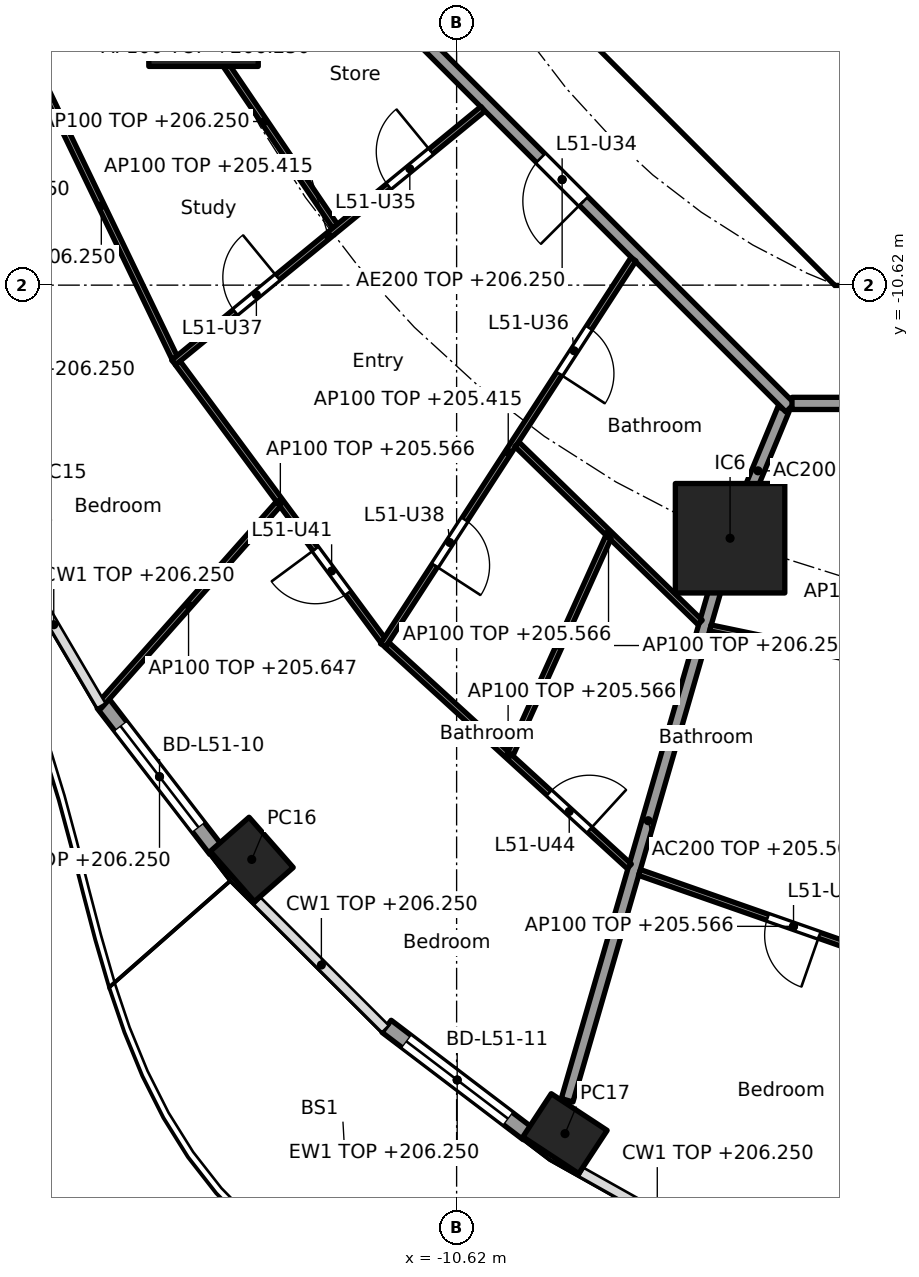
"""IFC4 building model, lengths in metres.
Left out: names, types, materials, properties, quantities, classifications, styles, units other than length and angle.
Written with IfcOpenShell. Run it as: python <this file> out.ifc"""

import sys

from ifc_helpers import new_model, si_unit, direction, frame, frame_2d, origin, origin_2d, place, context, subcontext, project, spatial, polyline, rectangle, hollow_rectangle, outline, extrude, element, fill, save


model = new_model("IFC4")
c1 = context("Model", 3, precision=1e-05, world=origin(), true_north=direction((0.0, 1.0)))
c2 = subcontext(c1, "Body", "Model", "MODEL_VIEW")
j1 = project(units=[si_unit("LENGTHUNIT", "METRE"), si_unit("PLANEANGLEUNIT", "RADIAN")], contexts=[c1])
p1 = place(None, origin())
s1 = spatial("IfcSite", under=j1, at=p1, CompositionType="ELEMENT")
p2 = place(p1, origin())
s2 = spatial("IfcBuilding", under=s1, at=p2, CompositionType="ELEMENT")
p3 = place(p2, frame((0.0, 0.0, 202.9)))
s3 = spatial("IfcBuildingStorey", under=s2, at=p3, CompositionType="ELEMENT", Elevation=202.9)
for number, where, z_axis, x_axis in (
    (1, (-13.989, -20.064, 0.0), (0.0, 0.0, 1.0), (0.66, -0.751, 0.0)),
    (2, (-8.837, -24.573, 0.0), (0.0, 0.0, 1.0), (0.836, -0.549, 0.0)),
):
    element("IfcColumn", number, at=place(p3, frame(where, z_axis=z_axis, x_axis=x_axis)), inside=s3, PredefinedType="COLUMN", context=c2, shape_type="SweptSolid", body=[
        extrude(hollow_rectangle(XDim=1.1, YDim=0.85, WallThickness=0.036, at=origin_2d()), origin(), (0.0, 0.0, 1.0), 3.7),
    ])
for number, where, z_axis, x_axis in (
    (3, (-14.782, -6.123, 0.0), (0.0, 0.0, 1.0), (1.0, 0.0, 0.0)),
    (4, (-6.123, -14.782, 0.0), (0.0, 0.0, 1.0), (1.0, 0.0, 0.0)),
):
    element("IfcColumn", number, at=place(p3, frame(where, z_axis=z_axis, x_axis=x_axis)), inside=s3, PredefinedType="COLUMN", context=c2, shape_type="SweptSolid", body=[
        extrude(rectangle(XDim=1.8, YDim=1.8, at=origin_2d()), origin(), (0.0, 0.0, 1.0), 3.7),
    ])
p4 = place(p3, frame((-14.58, -19.906, 0.0), z_axis=(0.0, 0.0, 1.0), x_axis=(-0.610437428894, 0.79206448311, 0.0)))
e5 = element("IfcWall", 5, at=p4, inside=s3, PredefinedType="SOLIDWALL", context=c2, shape_type="SweptSolid", body=[
    extrude(rectangle(XDim=3.035, YDim=0.25, at=frame_2d((1.518, 0.0))), origin(), (0.0, 0.0, 1.0), 3.35),
])
p5 = place(p4, frame((0.468, 0.0, 0.0)))
e6 = element("IfcOpeningElement", 6, at=p5, cuts=e5, PredefinedType="OPENING", context=c2, shape_type="SweptSolid", body=[
    extrude(rectangle(XDim=2.1, YDim=2.4, at=frame_2d((1.05, 1.2))), frame((0.0, 0.135, 0.0), z_axis=(0.0, -1.0, 0.0), x_axis=(1.0, 0.0, 0.0)), (0.0, 0.0, 1.0), 0.27),
])
p6 = place(p3, frame((-9.45, -24.574, 0.0), z_axis=(0.0, 0.0, 1.0), x_axis=(-0.796055733703, 0.60522332146, 0.0)))
e7 = element("IfcWall", 7, at=p6, inside=s3, PredefinedType="SOLIDWALL", context=c2, shape_type="SweptSolid", body=[
    extrude(rectangle(XDim=2.917, YDim=0.25, at=frame_2d((1.458, 0.0))), origin(), (0.0, 0.0, 1.0), 3.35),
])
p7 = place(p6, frame((0.408, 0.0, 0.0)))
e8 = element("IfcOpeningElement", 8, at=p7, cuts=e7, PredefinedType="OPENING", context=c2, shape_type="SweptSolid", body=[
    extrude(rectangle(XDim=2.1, YDim=2.4, at=frame_2d((1.05, 1.2))), frame((0.0, 0.135, 0.0), z_axis=(0.0, -1.0, 0.0), x_axis=(1.0, 0.0, 0.0)), (0.0, 0.0, 1.0), 0.27),
])
p8 = place(p3, frame((-9.988, -4.613, 0.0), z_axis=(0.0, 0.0, 1.0), x_axis=(0.707106781187, -0.707106781187, 0.0)))
e9 = element("IfcWall", 9, at=p8, inside=s3, PredefinedType="SHEAR", context=c2, shape_type="SweptSolid", body=[
    extrude(rectangle(XDim=7.602, YDim=0.6, at=frame_2d((3.801, 0.0))), origin(), (0.0, 0.0, 1.0), 3.35),
])
p9 = place(p8, frame((6.151, 0.0, 0.0)))
e10 = element("IfcOpeningElement", 10, at=p9, cuts=e9, PredefinedType="OPENING", context=c2, shape_type="SweptSolid", body=[
    extrude(rectangle(XDim=1.1, YDim=2.1, at=frame_2d((0.55, 1.05))), frame((0.0, 0.31, 0.0), z_axis=(0.0, -1.0, 0.0), x_axis=(1.0, 0.0, 0.0)), (0.0, 0.0, 1.0), 0.62),
])
p10 = place(p3, frame((-6.2, -7.827, 0.0), z_axis=(0.0, 0.0, 1.0), x_axis=(0.0, 1.0, 0.0)))
e11 = element("IfcWall", 11, at=p10, inside=s3, PredefinedType="PARTITIONING", context=c2, shape_type="SweptSolid", body=[
    extrude(rectangle(XDim=3.527, YDim=0.15, at=frame_2d((1.763, 0.0))), origin(), (0.0, 0.0, 1.0), 3.35),
])
p11 = place(p10, frame((2.365, 0.0, 0.0)))
e12 = element("IfcOpeningElement", 12, at=p11, cuts=e11, PredefinedType="OPENING", context=c2, shape_type="SweptSolid", body=[
    extrude(rectangle(XDim=0.9, YDim=2.1, at=frame_2d((0.45, 1.05))), frame((0.0, 0.085, 0.0), z_axis=(0.0, -1.0, 0.0), x_axis=(1.0, 0.0, 0.0)), (0.0, 0.0, 1.0), 0.17),
])
p12 = place(p10, frame((0.489, 0.0, 0.0)))
e13 = element("IfcOpeningElement", 13, at=p12, cuts=e11, PredefinedType="OPENING", context=c2, shape_type="SweptSolid", body=[
    extrude(rectangle(XDim=0.9, YDim=2.1, at=frame_2d((0.45, 1.05))), frame((0.0, 0.085, 0.0), z_axis=(0.0, -1.0, 0.0), x_axis=(1.0, 0.0, 0.0)), (0.0, 0.0, 1.0), 0.17),
])
p13 = place(p3, origin())
e14 = element("IfcWall", 14, at=p13, inside=s3, PredefinedType="SHEAR", context=c2, shape_type="SweptSolid", body=[
    extrude(outline(polyline([(-4.152, -10.025), (4.152, -10.025), (4.401, -9.776), (4.825, -10.2), (4.401, -10.625), (-4.401, -10.625), (-4.825, -10.2), (-4.401, -9.776), (-4.152, -10.025)])), origin(), (0.0, 0.0, 1.0), 3.35),
])
p14 = place(p3, frame((-5.243, -12.657, 0.0), z_axis=(0.0, 0.0, 1.0), x_axis=(-0.382707856524, -0.923869415315, 0.0)))
e15 = element("IfcWall", 15, at=p14, inside=s3, PredefinedType="PARTITIONING", context=c2, shape_type="SweptSolid", body=[
    extrude(rectangle(XDim=2.2, YDim=0.2, at=frame_2d((1.1, 0.0))), origin(), (0.0, 0.0, 1.0), 3.35),
])
p15 = place(p3, frame((-6.137, -14.83, 0.0), z_axis=(0.0, 0.0, 1.0), x_axis=(-0.278461169897, -0.96044748782, 0.0)))
e16 = element("IfcWall", 16, at=p15, inside=s3, PredefinedType="PARTITIONING", context=c2, shape_type="SweptSolid", body=[
    extrude(rectangle(XDim=9.573, YDim=0.2, at=frame_2d((4.787, 0.0))), origin(), (0.0, 0.0, 1.0), 2.666),
])
p16 = place(p3, frame((-12.635, -5.134, 0.0), z_axis=(0.0, 0.0, 1.0), x_axis=(0.707106781187, -0.707106781187, 0.0)))
e17 = element("IfcWall", 17, at=p16, inside=s3, PredefinedType="PARTITIONING", context=c2, shape_type="SweptSolid", body=[
    extrude(rectangle(XDim=10.609, YDim=0.2, at=frame_2d((5.305, 0.0))), origin(), (0.0, 0.0, 1.0), 3.35),
])
p17 = place(p16, frame((4.804, 0.0, 0.0)))
e18 = element("IfcOpeningElement", 18, at=p17, cuts=e17, PredefinedType="OPENING", context=c2, shape_type="SweptSolid", body=[
    extrude(rectangle(XDim=1.0, YDim=2.1, at=frame_2d((0.5, 1.05))), frame((0.0, 0.11, 0.0), z_axis=(0.0, -1.0, 0.0), x_axis=(1.0, 0.0, 0.0)), (0.0, 0.0, 1.0), 0.22),
])
p18 = place(p3, frame((-5.104, -12.565, 0.0), z_axis=(0.0, 0.0, 1.0), x_axis=(1.0, 0.0, 0.0)))
e19 = element("IfcWall", 19, at=p18, inside=s3, PredefinedType="PARTITIONING", context=c2, shape_type="SweptSolid", body=[
    extrude(rectangle(XDim=10.409, YDim=0.2, at=frame_2d((5.205, 0.0))), origin(), (0.0, 0.0, 1.0), 3.35),
])
p19 = place(p18, frame((6.339, 0.0, 0.0)))
e20 = element("IfcOpeningElement", 20, at=p19, cuts=e19, PredefinedType="OPENING", context=c2, shape_type="SweptSolid", body=[
    extrude(rectangle(XDim=1.0, YDim=2.1, at=frame_2d((0.5, 1.05))), frame((0.0, 0.11, 0.0), z_axis=(0.0, -1.0, 0.0), x_axis=(1.0, 0.0, 0.0)), (0.0, 0.0, 1.0), 0.22),
])
p20 = place(p3, frame((-14.952, -6.208, 0.0), z_axis=(0.0, 0.0, 1.0), x_axis=(0.561064907171, -0.827771810308, 0.0)))
e21 = element("IfcWall", 21, at=p20, inside=s3, PredefinedType="PARTITIONING", context=c2, shape_type="SweptSolid", body=[
    extrude(rectangle(XDim=4.159, YDim=0.1, at=frame_2d((2.079, 0.0))), origin(), (0.0, 0.0, 1.0), 3.35),
])
p21 = place(p3, frame((-17.669, -6.809, 0.0), z_axis=(0.0, 0.0, 1.0), x_axis=(0.434040130629, -0.900893536997, 0.0)))
e22 = element("IfcWall", 22, at=p21, inside=s3, PredefinedType="PARTITIONING", context=c2, shape_type="SweptSolid", body=[
    extrude(rectangle(XDim=5.558, YDim=0.1, at=frame_2d((2.779, 0.0))), origin(), (0.0, 0.0, 1.0), 3.35),
])
p22 = place(p3, frame((-10.189, -7.721, 0.0), z_axis=(0.0, 0.0, 1.0), x_axis=(-0.773121441079, -0.634258021112, 0.0)))
e23 = element("IfcWall", 23, at=p22, inside=s3, PredefinedType="PARTITIONING", context=c2, shape_type="SweptSolid", body=[
    extrude(rectangle(XDim=6.577, YDim=0.1, at=frame_2d((3.289, 0.0))), origin(), (0.0, 0.0, 1.0), 2.515),
])
p23 = place(p22, frame((1.104, 0.0, 0.0)))
e24 = element("IfcOpeningElement", 24, at=p23, cuts=e23, PredefinedType="OPENING", context=c2, shape_type="SweptSolid", body=[
    extrude(rectangle(XDim=0.9, YDim=2.1, at=frame_2d((0.45, 1.05))), frame((0.0, 0.06, 0.0), z_axis=(0.0, -1.0, 0.0), x_axis=(1.0, 0.0, 0.0)), (0.0, 0.0, 1.0), 0.12),
])
p24 = place(p22, frame((4.367, 0.0, 0.0)))
e25 = element("IfcOpeningElement", 25, at=p24, cuts=e23, PredefinedType="OPENING", context=c2, shape_type="SweptSolid", body=[
    extrude(rectangle(XDim=0.9, YDim=2.1, at=frame_2d((0.45, 1.05))), frame((0.0, 0.06, 0.0), z_axis=(0.0, -1.0, 0.0), x_axis=(1.0, 0.0, 0.0)), (0.0, 0.0, 1.0), 0.12),
])
p25 = place(p3, frame((-15.205, -11.901, 0.0), z_axis=(0.0, 0.0, 1.0), x_axis=(0.594704483906, -0.803944386647, 0.0)))
e26 = element("IfcWall", 26, at=p25, inside=s3, PredefinedType="PARTITIONING", context=c2, shape_type="SweptSolid", body=[
    extrude(rectangle(XDim=5.672, YDim=0.1, at=frame_2d((2.836, 0.0))), origin(), (0.0, 0.0, 1.0), 2.666),
])
p26 = place(p25, frame((3.804, 0.0, 0.0)))
e27 = element("IfcOpeningElement", 27, at=p26, cuts=e26, PredefinedType="OPENING", context=c2, shape_type="SweptSolid", body=[
    extrude(rectangle(XDim=0.9, YDim=2.1, at=frame_2d((0.45, 1.05))), frame((0.0, 0.06, 0.0), z_axis=(0.0, -1.0, 0.0), x_axis=(1.0, 0.0, 0.0)), (0.0, 0.0, 1.0), 0.12),
])
p27 = place(p3, frame((-13.552, -14.219, 0.0), z_axis=(0.0, 0.0, 1.0), x_axis=(-0.663542794709, -0.748138329181, 0.0)))
e28 = element("IfcWall", 28, at=p27, inside=s3, PredefinedType="PARTITIONING", context=c2, shape_type="SweptSolid", body=[
    extrude(rectangle(XDim=4.45, YDim=0.1, at=frame_2d((2.225, 0.0))), origin(), (0.0, 0.0, 1.0), 2.747),
])
p28 = place(p3, frame((-7.712, -10.195, 0.0), z_axis=(0.0, 0.0, 1.0), x_axis=(-0.544179442551, -0.838968851809, 0.0)))
e29 = element("IfcWall", 29, at=p28, inside=s3, PredefinedType="PARTITIONING", context=c2, shape_type="SweptSolid", body=[
    extrude(rectangle(XDim=7.566, YDim=0.1, at=frame_2d((3.783, 0.0))), origin(), (0.0, 0.0, 1.0), 2.515),
])
p29 = place(p28, frame((1.343, 0.0, 0.0)))
e30 = element("IfcOpeningElement", 30, at=p29, cuts=e29, PredefinedType="OPENING", context=c2, shape_type="SweptSolid", body=[
    extrude(rectangle(XDim=0.9, YDim=2.1, at=frame_2d((0.45, 1.05))), frame((0.0, 0.06, 0.0), z_axis=(0.0, -1.0, 0.0), x_axis=(1.0, 0.0, 0.0)), (0.0, 0.0, 1.0), 0.12),
])
p30 = place(p28, frame((5.101, 0.0, 0.0)))
e31 = element("IfcOpeningElement", 31, at=p30, cuts=e29, PredefinedType="OPENING", context=c2, shape_type="SweptSolid", body=[
    extrude(rectangle(XDim=0.9, YDim=2.1, at=frame_2d((0.45, 1.05))), frame((0.0, 0.06, 0.0), z_axis=(0.0, -1.0, 0.0), x_axis=(1.0, 0.0, 0.0)), (0.0, 0.0, 1.0), 0.12),
])
p31 = place(p3, frame((-9.627, -13.238, 0.0), z_axis=(0.0, 0.0, 1.0), x_axis=(0.716919058692, -0.697156412352, 0.0)))
e32 = element("IfcWall", 32, at=p31, inside=s3, PredefinedType="PARTITIONING", context=c2, shape_type="SweptSolid", body=[
    extrude(rectangle(XDim=4.2, YDim=0.1, at=frame_2d((2.1, 0.0))), origin(), (0.0, 0.0, 1.0), 2.666),
])
p32 = place(p3, frame((-11.766, -16.535, 0.0), z_axis=(0.0, 0.0, 1.0), x_axis=(0.73807320557, -0.674720640872, 0.0)))
e33 = element("IfcWall", 33, at=p32, inside=s3, PredefinedType="PARTITIONING", context=c2, shape_type="SweptSolid", body=[
    extrude(rectangle(XDim=5.399, YDim=0.1, at=frame_2d((2.699, 0.0))), origin(), (0.0, 0.0, 1.0), 2.666),
])
p33 = place(p32, frame((3.612, 0.0, 0.0)))
e34 = element("IfcOpeningElement", 34, at=p33, cuts=e33, PredefinedType="OPENING", context=c2, shape_type="SweptSolid", body=[
    extrude(rectangle(XDim=0.9, YDim=2.1, at=frame_2d((0.45, 1.05))), frame((0.0, 0.06, 0.0), z_axis=(0.0, -1.0, 0.0), x_axis=(1.0, 0.0, 0.0)), (0.0, 0.0, 1.0), 0.12),
])
p34 = place(p3, frame((-8.125, -14.765, 0.0), z_axis=(0.0, 0.0, 1.0), x_axis=(-0.411745679848, -0.911298795745, 0.0)))
e35 = element("IfcWall", 35, at=p34, inside=s3, PredefinedType="PARTITIONING", context=c2, shape_type="SweptSolid", body=[
    extrude(rectangle(XDim=3.909, YDim=0.1, at=frame_2d((1.955, 0.0))), origin(), (0.0, 0.0, 1.0), 3.35),
])
p35 = place(p3, frame((-6.447, -16.256, 0.0), z_axis=(0.0, 0.0, 1.0), x_axis=(0.978902917122, -0.20432591331, 0.0)))
e36 = element("IfcWall", 36, at=p35, inside=s3, PredefinedType="PARTITIONING", context=c2, shape_type="SweptSolid", body=[
    extrude(rectangle(XDim=4.486, YDim=0.1, at=frame_2d((2.243, 0.0))), origin(), (0.0, 0.0, 1.0), 2.666),
])
p36 = place(p3, frame((-7.613, -20.278, 0.0), z_axis=(0.0, 0.0, 1.0), x_axis=(0.94391294884, -0.330194404878, 0.0)))
e37 = element("IfcWall", 37, at=p36, inside=s3, PredefinedType="PARTITIONING", context=c2, shape_type="SweptSolid", body=[
    extrude(rectangle(XDim=5.367, YDim=0.1, at=frame_2d((2.684, 0.0))), origin(), (0.0, 0.0, 1.0), 2.666),
])
p37 = place(p36, frame((2.234, 0.0, 0.0)))
e38 = element("IfcOpeningElement", 38, at=p37, cuts=e37, PredefinedType="OPENING", context=c2, shape_type="SweptSolid", body=[
    extrude(rectangle(XDim=0.9, YDim=2.1, at=frame_2d((0.45, 1.05))), frame((0.0, 0.06, 0.0), z_axis=(0.0, -1.0, 0.0), x_axis=(1.0, 0.0, 0.0)), (0.0, 0.0, 1.0), 0.12),
])
p38 = place(p5, origin())
e39 = element("IfcDoor", 39, at=p38, inside=s3, OperationType="SLIDING_TO_LEFT", PredefinedType="DOOR", context=c2, shape_type="SweptSolid", body=[
    extrude(rectangle(XDim=2.1, YDim=2.4, at=frame_2d((1.05, 1.2))), frame((0.0, 0.025, 0.0), z_axis=(0.0, -1.0, 0.0), x_axis=(1.0, 0.0, 0.0)), (0.0, 0.0, 1.0), 0.05),
])
fill(e6, e39)
p39 = place(p7, origin())
e40 = element("IfcDoor", 40, at=p39, inside=s3, OperationType="SLIDING_TO_LEFT", PredefinedType="DOOR", context=c2, shape_type="SweptSolid", body=[
    extrude(rectangle(XDim=2.1, YDim=2.4, at=frame_2d((1.05, 1.2))), frame((0.0, 0.025, 0.0), z_axis=(0.0, -1.0, 0.0), x_axis=(1.0, 0.0, 0.0)), (0.0, 0.0, 1.0), 0.05),
])
fill(e8, e40)
p40 = place(p12, origin())
e41 = element("IfcDoor", 41, at=p40, inside=s3, OperationType="SINGLE_SWING_RIGHT", PredefinedType="DOOR", context=c2, shape_type="SweptSolid", body=[
    extrude(rectangle(XDim=0.9, YDim=2.1, at=frame_2d((0.45, 1.05))), frame((0.0, 0.025, 0.0), z_axis=(0.0, -1.0, 0.0), x_axis=(1.0, 0.0, 0.0)), (0.0, 0.0, 1.0), 0.05),
])
fill(e13, e41)
p41 = place(p9, origin())
e42 = element("IfcDoor", 42, at=p41, inside=s3, OperationType="SINGLE_SWING_RIGHT", PredefinedType="DOOR", context=c2, shape_type="SweptSolid", body=[
    extrude(rectangle(XDim=1.1, YDim=2.1, at=frame_2d((0.55, 1.05))), frame((0.0, 0.025, 0.0), z_axis=(0.0, -1.0, 0.0), x_axis=(1.0, 0.0, 0.0)), (0.0, 0.0, 1.0), 0.05),
])
fill(e10, e42)
p42 = place(p37, frame((0.9, 0.0, 0.0), x_axis=(-1.0, 0.0, 0.0)))
e43 = element("IfcDoor", 43, at=p42, inside=s3, OperationType="SINGLE_SWING_LEFT", PredefinedType="DOOR", context=c2, shape_type="SweptSolid", body=[
    extrude(rectangle(XDim=0.9, YDim=2.1, at=frame_2d((0.45, 1.05))), frame((0.0, 0.025, 0.0), z_axis=(0.0, -1.0, 0.0), x_axis=(1.0, 0.0, 0.0)), (0.0, 0.0, 1.0), 0.05),
])
fill(e38, e43)
p43 = place(p17, frame((1.0, 0.0, 0.0), x_axis=(-1.0, 0.0, 0.0)))
e44 = element("IfcDoor", 44, at=p43, inside=s3, OperationType="SINGLE_SWING_LEFT", PredefinedType="DOOR", context=c2, shape_type="SweptSolid", body=[
    extrude(rectangle(XDim=1.0, YDim=2.1, at=frame_2d((0.5, 1.05))), frame((0.0, 0.025, 0.0), z_axis=(0.0, -1.0, 0.0), x_axis=(1.0, 0.0, 0.0)), (0.0, 0.0, 1.0), 0.05),
])
fill(e18, e44)
p44 = place(p23, frame((0.9, 0.0, 0.0), x_axis=(-1.0, 0.0, 0.0)))
e45 = element("IfcDoor", 45, at=p44, inside=s3, OperationType="SINGLE_SWING_RIGHT", PredefinedType="DOOR", context=c2, shape_type="SweptSolid", body=[
    extrude(rectangle(XDim=0.9, YDim=2.1, at=frame_2d((0.45, 1.05))), frame((0.0, 0.025, 0.0), z_axis=(0.0, -1.0, 0.0), x_axis=(1.0, 0.0, 0.0)), (0.0, 0.0, 1.0), 0.05),
])
fill(e24, e45)
p45 = place(p29, origin())
e46 = element("IfcDoor", 46, at=p45, inside=s3, OperationType="SINGLE_SWING_RIGHT", PredefinedType="DOOR", context=c2, shape_type="SweptSolid", body=[
    extrude(rectangle(XDim=0.9, YDim=2.1, at=frame_2d((0.45, 1.05))), frame((0.0, 0.025, 0.0), z_axis=(0.0, -1.0, 0.0), x_axis=(1.0, 0.0, 0.0)), (0.0, 0.0, 1.0), 0.05),
])
fill(e30, e46)
p46 = place(p24, frame((0.9, 0.0, 0.0), x_axis=(-1.0, 0.0, 0.0)))
e47 = element("IfcDoor", 47, at=p46, inside=s3, OperationType="SINGLE_SWING_RIGHT", PredefinedType="DOOR", context=c2, shape_type="SweptSolid", body=[
    extrude(rectangle(XDim=0.9, YDim=2.1, at=frame_2d((0.45, 1.05))), frame((0.0, 0.025, 0.0), z_axis=(0.0, -1.0, 0.0), x_axis=(1.0, 0.0, 0.0)), (0.0, 0.0, 1.0), 0.05),
])
fill(e25, e47)
p47 = place(p30, origin())
e48 = element("IfcDoor", 48, at=p47, inside=s3, OperationType="SINGLE_SWING_RIGHT", PredefinedType="DOOR", context=c2, shape_type="SweptSolid", body=[
    extrude(rectangle(XDim=0.9, YDim=2.1, at=frame_2d((0.45, 1.05))), frame((0.0, 0.025, 0.0), z_axis=(0.0, -1.0, 0.0), x_axis=(1.0, 0.0, 0.0)), (0.0, 0.0, 1.0), 0.05),
])
fill(e31, e48)
p48 = place(p26, frame((0.9, 0.0, 0.0), x_axis=(-1.0, 0.0, 0.0)))
e49 = element("IfcDoor", 49, at=p48, inside=s3, OperationType="SINGLE_SWING_RIGHT", PredefinedType="DOOR", context=c2, shape_type="SweptSolid", body=[
    extrude(rectangle(XDim=0.9, YDim=2.1, at=frame_2d((0.45, 1.05))), frame((0.0, 0.025, 0.0), z_axis=(0.0, -1.0, 0.0), x_axis=(1.0, 0.0, 0.0)), (0.0, 0.0, 1.0), 0.05),
])
fill(e27, e49)
p49 = place(p33, origin())
e50 = element("IfcDoor", 50, at=p49, inside=s3, OperationType="SINGLE_SWING_RIGHT", PredefinedType="DOOR", context=c2, shape_type="SweptSolid", body=[
    extrude(rectangle(XDim=0.9, YDim=2.1, at=frame_2d((0.45, 1.05))), frame((0.0, 0.025, 0.0), z_axis=(0.0, -1.0, 0.0), x_axis=(1.0, 0.0, 0.0)), (0.0, 0.0, 1.0), 0.05),
])
fill(e34, e50)
save(model, sys.argv[1])
